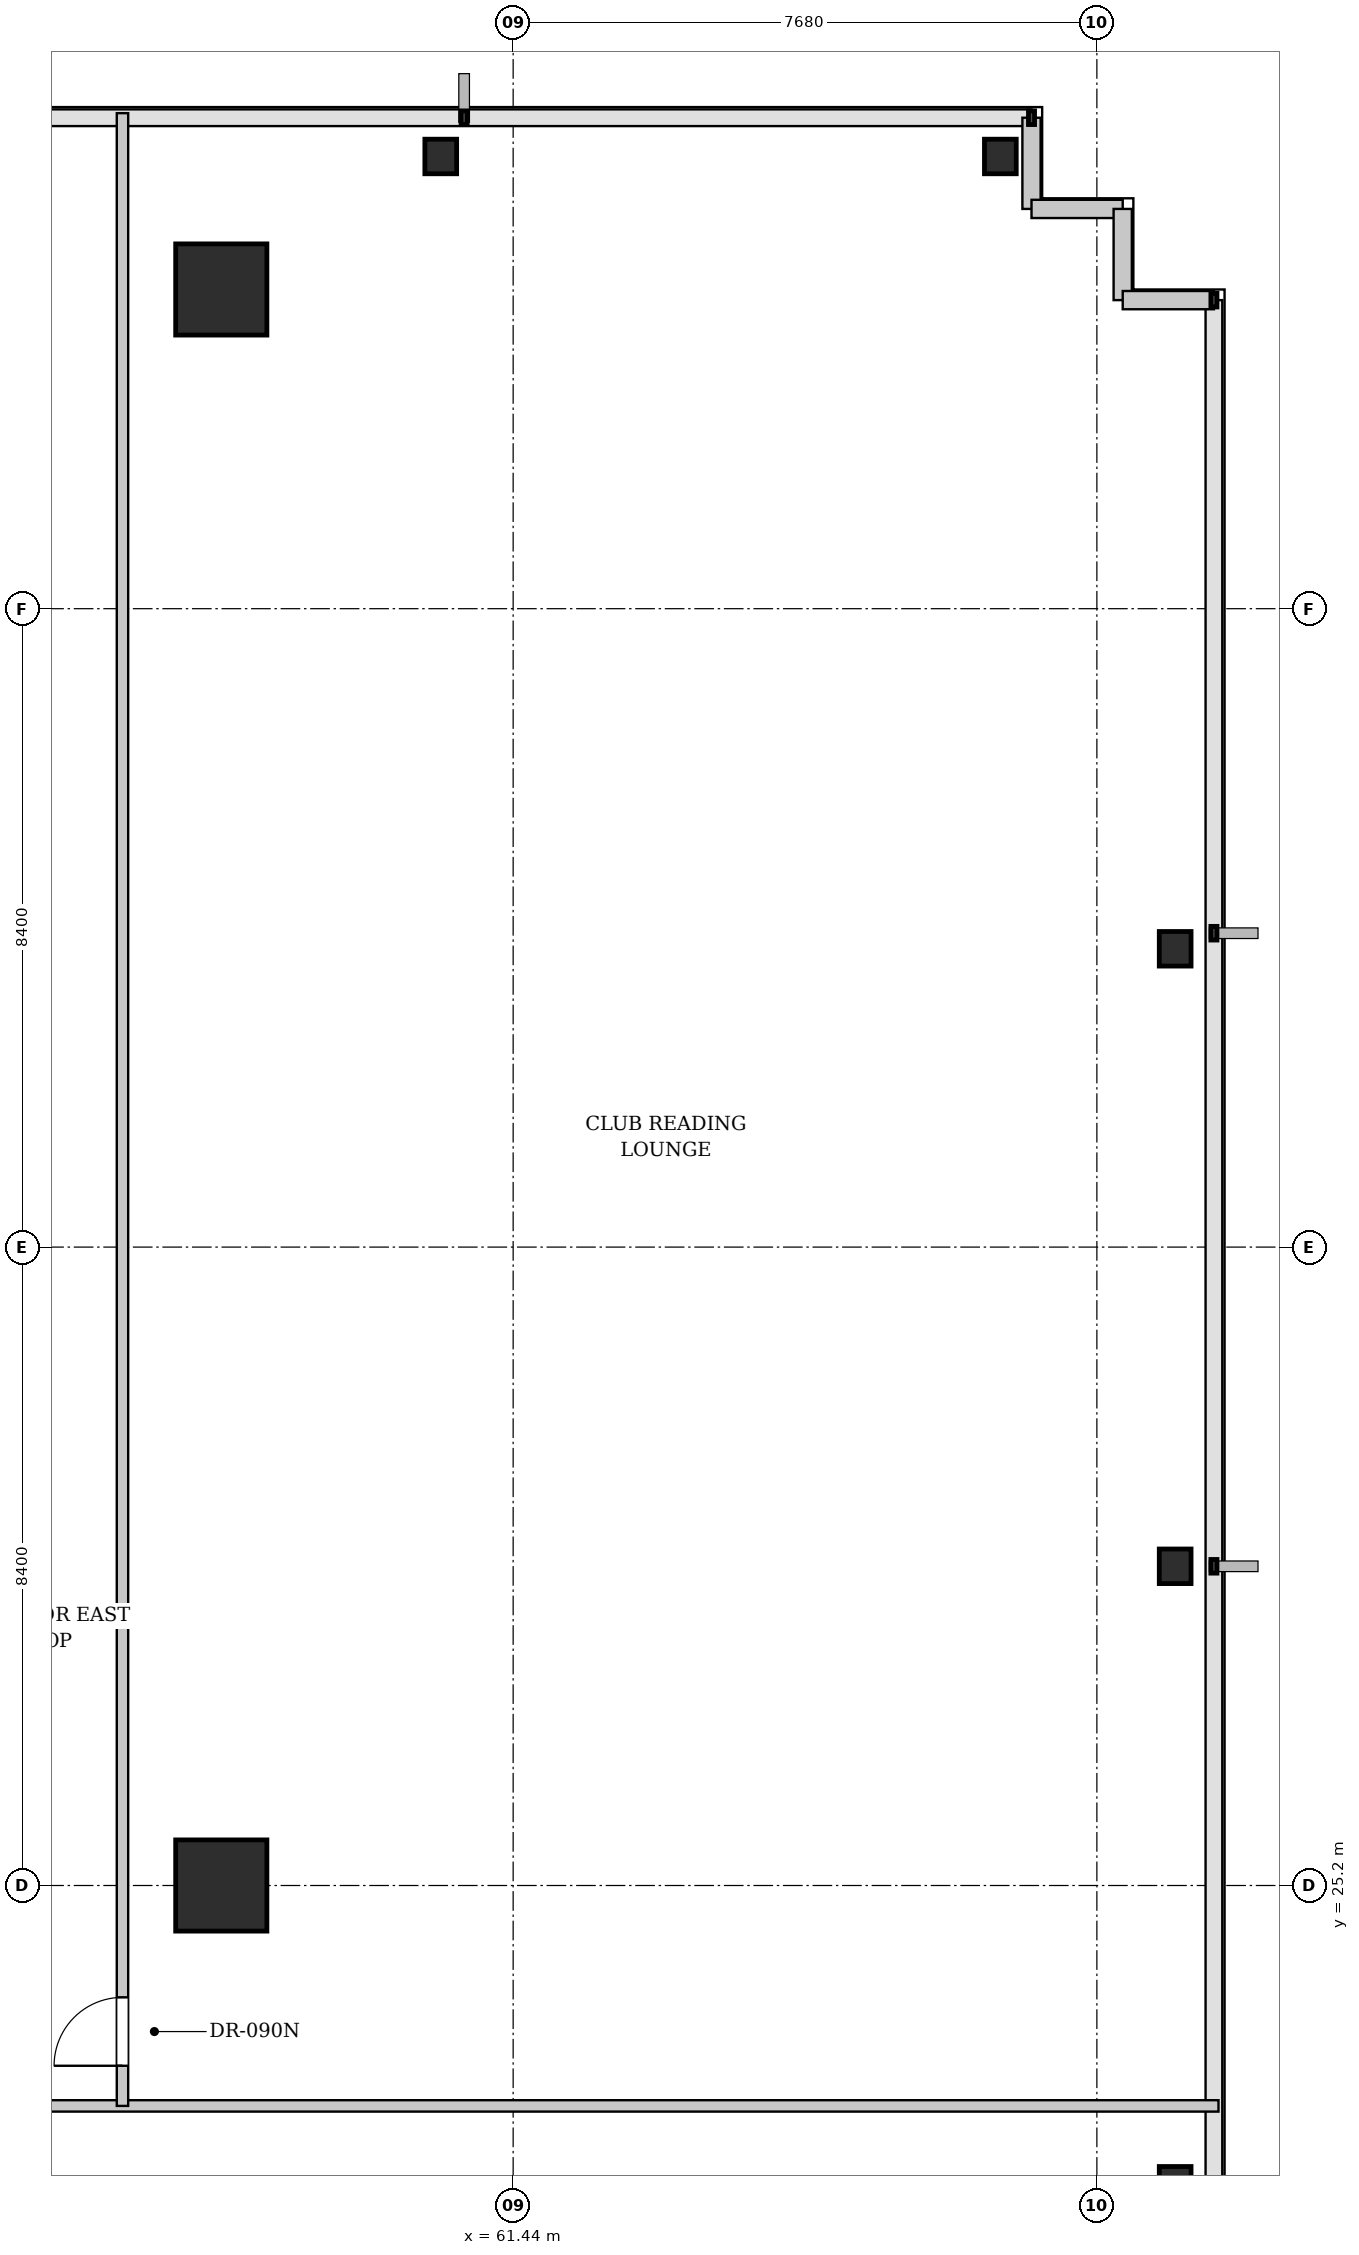
"""IFC4 building model, lengths in metres.
Left out: names, types, materials, properties, quantities, classifications, styles, units other than length and angle.
Written with IfcOpenShell. Run it as: python <this file> out.ifc"""

import sys

from ifc_helpers import new_model, si_unit, direction, frame, frame_2d, origin, origin_2d, place, context, subcontext, project, spatial, rectangle, i_section, extrude, element, fill, save


model = new_model("IFC4")
c1 = context("Model", 3, precision=1e-05, world=origin(), true_north=direction((0.0, 1.0)))
c2 = subcontext(c1, "Body", "Model", "MODEL_VIEW")
j1 = project(units=[si_unit("LENGTHUNIT", "METRE"), si_unit("PLANEANGLEUNIT", "RADIAN")], contexts=[c1])
p1 = place(None, origin())
s1 = spatial("IfcSite", under=j1, at=p1, CompositionType="ELEMENT")
p2 = place(p1, origin())
s2 = spatial("IfcBuilding", under=s1, at=p2, CompositionType="ELEMENT")
p3 = place(p2, frame((0.0, 0.0, 47.4)))
s3 = spatial("IfcBuildingStorey", under=s2, at=p3, CompositionType="ELEMENT", Elevation=47.4)
for number, where, z_axis, x_axis in (
    (1, (57.6, 25.2, 0.0), (0.0, 0.0, 1.0), (1.0, 0.0, 0.0)),
    (2, (57.6, 46.2, 0.0), (0.0, 0.0, 1.0), (1.0, 0.0, 0.0)),
):
    element("IfcColumn", number, at=place(p3, frame(where, z_axis=z_axis, x_axis=x_axis)), inside=s3, PredefinedType="COLUMN", context=c2, shape_type="SweptSolid", body=[
        extrude(rectangle(XDim=1.2, YDim=1.2, at=origin_2d()), origin(), (0.0, 0.0, 1.0), 3.4),
    ])
for number, where, z_axis, x_axis in (
    (3, (60.488, 47.95, 0.0), (0.0, 0.0, 1.0), (1.0, 0.0, 0.0)),
    (4, (67.85, 47.95, 0.0), (0.0, 0.0, 1.0), (1.0, 0.0, 0.0)),
    (5, (70.15, 21.275, 0.0), (0.0, 0.0, 1.0), (1.0, 0.0, 0.0)),
    (6, (70.15, 29.4, 0.0), (0.0, 0.0, 1.0), (1.0, 0.0, 0.0)),
    (7, (70.15, 37.525, 0.0), (0.0, 0.0, 1.0), (1.0, 0.0, 0.0)),
):
    element("IfcColumn", number, at=place(p3, frame(where, z_axis=z_axis, x_axis=x_axis)), inside=s3, PredefinedType="COLUMN", context=c2, shape_type="SweptSolid", body=[
        extrude(i_section(OverallWidth=0.418, OverallDepth=0.455, WebThickness=0.042, FlangeThickness=0.068, FilletRadius=0.015, at=origin_2d()), origin(), (0.0, 0.0, 1.0), 3.4),
    ])
for number, where, z_axis, x_axis in (
    (8, (68.26, 48.46, 0.0), (0.0, 0.0, 1.0), (0.0, -1.0, 0.0)),
    (9, (68.26, 47.26, 0.0), (0.0, 0.0, 1.0), (1.0, 0.0, 0.0)),
    (10, (69.46, 47.26, 0.0), (0.0, 0.0, 1.0), (0.0, -1.0, 0.0)),
    (11, (69.46, 46.06, 0.0), (0.0, 0.0, 1.0), (1.0, 0.0, 0.0)),
):
    element("IfcWall", number, at=place(p3, frame(where, z_axis=z_axis, x_axis=x_axis)), inside=s3, PredefinedType="SOLIDWALL", context=c2, shape_type="SweptSolid", body=[
        extrude(rectangle(XDim=1.2, YDim=0.24, at=frame_2d((0.6, 0.0))), origin(), (0.0, 0.0, 1.0), 3.18),
    ])
p4 = place(p3, frame((6.08, 22.3, 0.0), z_axis=(0.0, 0.0, 1.0), x_axis=(1.0, 0.0, 0.0)))
e12 = element("IfcWall", 12, at=p4, inside=s3, PredefinedType="PARTITIONING", context=c2, shape_type="SweptSolid", body=[
    extrude(rectangle(XDim=64.64, YDim=0.15, at=frame_2d((32.32, 0.0))), origin(), (0.0, 0.0, 1.0), 3.18),
])
p5 = place(p4, frame((19.214, 0.0, 0.0)))
e13 = element("IfcOpeningElement", 13, at=p5, cuts=e12, PredefinedType="OPENING", context=c2, shape_type="SweptSolid", body=[
    extrude(rectangle(XDim=1.0, YDim=2.15, at=frame_2d((0.5, 1.075))), frame((0.0, 0.085, 0.0), z_axis=(0.0, -1.0, 0.0), x_axis=(1.0, 0.0, 0.0)), (0.0, 0.0, 1.0), 0.17),
])
p6 = place(p4, frame((28.139, 0.0, 0.0)))
e14 = element("IfcOpeningElement", 14, at=p6, cuts=e12, PredefinedType="OPENING", context=c2, shape_type="SweptSolid", body=[
    extrude(rectangle(XDim=1.0, YDim=2.15, at=frame_2d((0.5, 1.075))), frame((0.0, 0.085, 0.0), z_axis=(0.0, -1.0, 0.0), x_axis=(1.0, 0.0, 0.0)), (0.0, 0.0, 1.0), 0.17),
])
p7 = place(p4, frame((35.501, 0.0, 0.0)))
e15 = element("IfcOpeningElement", 15, at=p7, cuts=e12, PredefinedType="OPENING", context=c2, shape_type="SweptSolid", body=[
    extrude(rectangle(XDim=1.0, YDim=2.15, at=frame_2d((0.5, 1.075))), frame((0.0, 0.085, 0.0), z_axis=(0.0, -1.0, 0.0), x_axis=(1.0, 0.0, 0.0)), (0.0, 0.0, 1.0), 0.17),
])
p8 = place(p4, frame((44.451, 0.0, 0.0)))
e16 = element("IfcOpeningElement", 16, at=p8, cuts=e12, PredefinedType="OPENING", context=c2, shape_type="SweptSolid", body=[
    extrude(rectangle(XDim=1.0, YDim=2.15, at=frame_2d((0.5, 1.075))), frame((0.0, 0.085, 0.0), z_axis=(0.0, -1.0, 0.0), x_axis=(1.0, 0.0, 0.0)), (0.0, 0.0, 1.0), 0.17),
])
p9 = place(p3, frame((56.3, 22.3, 0.0), z_axis=(0.0, 0.0, 1.0), x_axis=(0.0, 1.0, 0.0)))
e17 = element("IfcWall", 17, at=p9, inside=s3, PredefinedType="PARTITIONING", context=c2, shape_type="SweptSolid", body=[
    extrude(rectangle(XDim=26.22, YDim=0.15, at=frame_2d((13.11, 0.0))), origin(), (0.0, 0.0, 1.0), 3.18),
])
p10 = place(p9, frame((0.528, 0.0, 0.0)))
e18 = element("IfcOpeningElement", 18, at=p10, cuts=e17, PredefinedType="OPENING", context=c2, shape_type="SweptSolid", body=[
    extrude(rectangle(XDim=0.9, YDim=2.15, at=frame_2d((0.45, 1.075))), frame((0.0, 0.085, 0.0), z_axis=(0.0, -1.0, 0.0), x_axis=(1.0, 0.0, 0.0)), (0.0, 0.0, 1.0), 0.17),
])
p11 = place(p10, origin())
e19 = element("IfcDoor", 19, at=p11, inside=s3, OperationType="SINGLE_SWING_LEFT", PredefinedType="DOOR", context=c2, shape_type="SweptSolid", body=[
    extrude(rectangle(XDim=0.9, YDim=2.15, at=frame_2d((0.45, 1.075))), frame((0.0, 0.025, 0.0), z_axis=(0.0, -1.0, 0.0), x_axis=(1.0, 0.0, 0.0)), (0.0, 0.0, 1.0), 0.05),
])
fill(e18, e19)
save(model, sys.argv[1])
